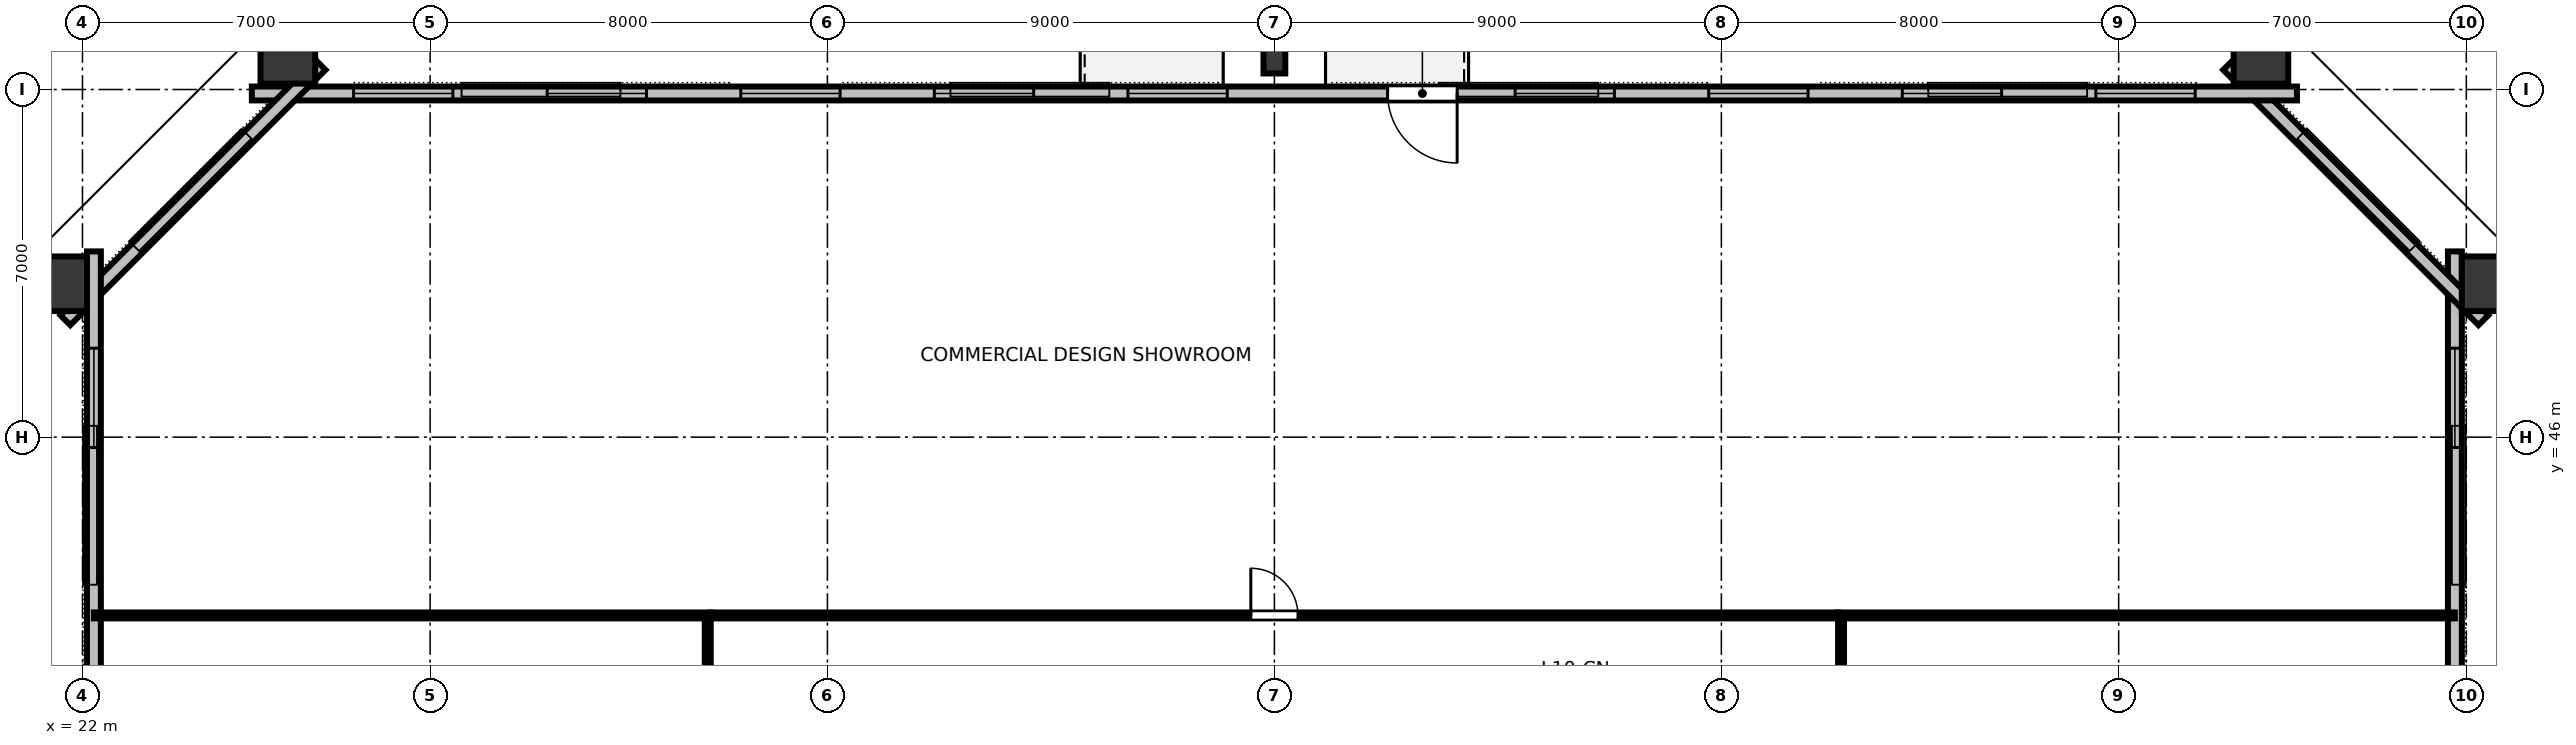
"""IFC4 building model, lengths in metres.
Left out: names, types, materials, properties, quantities, classifications, styles, units other than length and angle.
Written with IfcOpenShell. Run it as: python <this file> out.ifc"""

import sys

from ifc_helpers import new_model, si_unit, direction, frame, frame_2d, origin, origin_2d, place, context, subcontext, project, spatial, rectangle, hollow_rectangle, i_section, extrude, element, fill, save


model = new_model("IFC4")
c1 = context("Model", 3, precision=1e-05, world=origin(), true_north=direction((0.0, 1.0)))
c2 = subcontext(c1, "Body", "Model", "MODEL_VIEW")
j1 = project(units=[si_unit("LENGTHUNIT", "METRE"), si_unit("PLANEANGLEUNIT", "RADIAN")], contexts=[c1])
p1 = place(None, origin())
s1 = spatial("IfcSite", under=j1, at=p1, CompositionType="ELEMENT")
p2 = place(p1, origin())
s2 = spatial("IfcBuilding", under=s1, at=p2, CompositionType="ELEMENT")
p3 = place(p2, frame((0.0, 0.0, 42.4)))
s3 = spatial("IfcBuildingStorey", under=s2, at=p3, CompositionType="ELEMENT", Elevation=42.4)
for number, where, z_axis, x_axis in (
    (1, (70.559, 49.089, 0.0), (0.0, 0.0, 1.0), (0.0, 1.0, 0.0)),
    (2, (65.865, 53.768, 0.0), (0.0, 0.0, 1.0), (1.0, 0.0, 0.0)),
):
    element("IfcColumn", number, at=place(p3, frame(where, z_axis=z_axis, x_axis=x_axis)), inside=s3, PredefinedType="COLUMN", context=c2, shape_type="SweptSolid", body=[
        extrude(hollow_rectangle(XDim=1.1, YDim=1.3, WallThickness=0.07, at=origin_2d()), origin(), (0.0, 0.0, 1.0), 3.148),
    ])
p4 = place(p3, frame((46.0, 53.58, 0.0), z_axis=(0.0, 0.0, 1.0), x_axis=(1.0, 0.0, 0.0)))
e3 = element("IfcColumn", 3, at=p4, inside=s3, PredefinedType="COLUMN", context=c2, shape_type="SweptSolid", body=[
    extrude(i_section(OverallWidth=0.439, OverallDepth=0.514, WebThickness=0.06, FlangeThickness=0.097, FilletRadius=0.025, at=origin_2d()), origin(), (0.0, 0.0, 1.0), 3.148),
])
for number, where, z_axis, x_axis in (
    (4, (26.135, 53.768, 0.0), (0.0, 0.0, 1.0), (1.0, 0.0, 0.0)),
    (5, (21.441, 49.089, 0.0), (0.0, 0.0, 1.0), (0.0, 1.0, 0.0)),
):
    element("IfcColumn", number, at=place(p3, frame(where, z_axis=z_axis, x_axis=x_axis)), inside=s3, PredefinedType="COLUMN", context=c2, shape_type="SweptSolid", body=[
        extrude(hollow_rectangle(XDim=1.1, YDim=1.3, WallThickness=0.07, at=origin_2d()), origin(), (0.0, 0.0, 1.0), 3.148),
    ])
p5 = place(p3, frame((69.77, 14.26, 0.0), z_axis=(0.0, 0.0, 1.0), x_axis=(0.0, 1.0, 0.0)))
e6 = element("IfcWall", 6, at=p5, inside=s3, PredefinedType="STANDARD", context=c2, shape_type="SweptSolid", body=[
    extrude(rectangle(XDim=35.48, YDim=0.28, at=frame_2d((17.74, 0.0))), origin(), (0.0, 0.0, 1.0), 3.15),
])
p6 = place(p5, frame((1.949, 0.0, 0.8)))
e7 = element("IfcOpeningElement", 7, at=p6, cuts=e6, PredefinedType="OPENING", context=c2, shape_type="SweptSolid", body=[
    extrude(rectangle(XDim=2.0, YDim=1.95, at=frame_2d((1.0, 0.975))), frame((0.0, 0.15, 0.0), z_axis=(0.0, -1.0, 0.0), x_axis=(1.0, 0.0, 0.0)), (0.0, 0.0, 1.0), 0.3),
])
p7 = place(p5, frame((9.344, 0.0, 0.8)))
e8 = element("IfcOpeningElement", 8, at=p7, cuts=e6, PredefinedType="OPENING", context=c2, shape_type="SweptSolid", body=[
    extrude(rectangle(XDim=2.0, YDim=1.95, at=frame_2d((1.0, 0.975))), frame((0.0, 0.15, 0.0), z_axis=(0.0, -1.0, 0.0), x_axis=(1.0, 0.0, 0.0)), (0.0, 0.0, 1.0), 0.3),
])
p8 = place(p5, frame((13.042, 0.0, 0.8)))
e9 = element("IfcOpeningElement", 9, at=p8, cuts=e6, PredefinedType="OPENING", context=c2, shape_type="SweptSolid", body=[
    extrude(rectangle(XDim=2.0, YDim=1.95, at=frame_2d((1.0, 0.975))), frame((0.0, 0.15, 0.0), z_axis=(0.0, -1.0, 0.0), x_axis=(1.0, 0.0, 0.0)), (0.0, 0.0, 1.0), 0.3),
])
p9 = place(p5, frame((20.438, 0.0, 0.8)))
e10 = element("IfcOpeningElement", 10, at=p9, cuts=e6, PredefinedType="OPENING", context=c2, shape_type="SweptSolid", body=[
    extrude(rectangle(XDim=2.0, YDim=1.95, at=frame_2d((1.0, 0.975))), frame((0.0, 0.15, 0.0), z_axis=(0.0, -1.0, 0.0), x_axis=(1.0, 0.0, 0.0)), (0.0, 0.0, 1.0), 0.3),
])
p10 = place(p5, frame((24.135, 0.0, 0.8)))
e11 = element("IfcOpeningElement", 11, at=p10, cuts=e6, PredefinedType="OPENING", context=c2, shape_type="SweptSolid", body=[
    extrude(rectangle(XDim=2.0, YDim=1.95, at=frame_2d((1.0, 0.975))), frame((0.0, 0.15, 0.0), z_axis=(0.0, -1.0, 0.0), x_axis=(1.0, 0.0, 0.0)), (0.0, 0.0, 1.0), 0.3),
])
p11 = place(p5, frame((31.531, 0.0, 0.8)))
e12 = element("IfcOpeningElement", 12, at=p11, cuts=e6, PredefinedType="OPENING", context=c2, shape_type="SweptSolid", body=[
    extrude(rectangle(XDim=2.0, YDim=1.95, at=frame_2d((1.0, 0.975))), frame((0.0, 0.15, 0.0), z_axis=(0.0, -1.0, 0.0), x_axis=(1.0, 0.0, 0.0)), (0.0, 0.0, 1.0), 0.3),
])
p12 = place(p3, frame((70.344, 48.354, 0.0), z_axis=(0.0, 0.0, 1.0), x_axis=(-0.707106781187, 0.707106781187, 0.0)))
e13 = element("IfcWall", 13, at=p12, inside=s3, PredefinedType="STANDARD", context=c2, shape_type="SweptSolid", body=[
    extrude(rectangle(XDim=7.268, YDim=0.28, at=frame_2d((3.634, 0.0))), origin(), (0.0, 0.0, 1.0), 3.15),
])
p13 = place(p3, frame((66.59, 52.92, 0.0), z_axis=(0.0, 0.0, 1.0), x_axis=(-1.0, 0.0, 0.0)))
e14 = element("IfcWall", 14, at=p13, inside=s3, PredefinedType="STANDARD", context=c2, shape_type="SweptSolid", body=[
    extrude(rectangle(XDim=41.18, YDim=0.28, at=frame_2d((20.59, 0.0))), origin(), (0.0, 0.0, 1.0), 3.15),
])
p14 = place(p13, frame((16.91, 0.0, 0.0)))
e15 = element("IfcOpeningElement", 15, at=p14, cuts=e14, PredefinedType="OPENING", context=c2, shape_type="SweptSolid", body=[
    extrude(rectangle(XDim=1.4, YDim=2.15, at=frame_2d((0.7, 1.075))), frame((0.0, 0.15, 0.0), z_axis=(0.0, -1.0, 0.0), x_axis=(1.0, 0.0, 0.0)), (0.0, 0.0, 1.0), 0.3),
])
p15 = place(p13, frame((2.049, 0.0, 0.8)))
e16 = element("IfcOpeningElement", 16, at=p15, cuts=e14, PredefinedType="OPENING", context=c2, shape_type="SweptSolid", body=[
    extrude(rectangle(XDim=2.0, YDim=1.95, at=frame_2d((1.0, 0.975))), frame((0.0, 0.15, 0.0), z_axis=(0.0, -1.0, 0.0), x_axis=(1.0, 0.0, 0.0)), (0.0, 0.0, 1.0), 0.3),
])
p16 = place(p13, frame((5.947, 0.0, 0.8)))
e17 = element("IfcOpeningElement", 17, at=p16, cuts=e14, PredefinedType="OPENING", context=c2, shape_type="SweptSolid", body=[
    extrude(rectangle(XDim=2.0, YDim=1.95, at=frame_2d((1.0, 0.975))), frame((0.0, 0.15, 0.0), z_axis=(0.0, -1.0, 0.0), x_axis=(1.0, 0.0, 0.0)), (0.0, 0.0, 1.0), 0.3),
])
p17 = place(p13, frame((9.845, 0.0, 0.8)))
e18 = element("IfcOpeningElement", 18, at=p17, cuts=e14, PredefinedType="OPENING", context=c2, shape_type="SweptSolid", body=[
    extrude(rectangle(XDim=2.0, YDim=1.95, at=frame_2d((1.0, 0.975))), frame((0.0, 0.15, 0.0), z_axis=(0.0, -1.0, 0.0), x_axis=(1.0, 0.0, 0.0)), (0.0, 0.0, 1.0), 0.3),
])
p18 = place(p13, frame((13.743, 0.0, 0.8)))
e19 = element("IfcOpeningElement", 19, at=p18, cuts=e14, PredefinedType="OPENING", context=c2, shape_type="SweptSolid", body=[
    extrude(rectangle(XDim=2.0, YDim=1.95, at=frame_2d((1.0, 0.975))), frame((0.0, 0.15, 0.0), z_axis=(0.0, -1.0, 0.0), x_axis=(1.0, 0.0, 0.0)), (0.0, 0.0, 1.0), 0.3),
])
p19 = place(p13, frame((21.539, 0.0, 0.8)))
e20 = element("IfcOpeningElement", 20, at=p19, cuts=e14, PredefinedType="OPENING", context=c2, shape_type="SweptSolid", body=[
    extrude(rectangle(XDim=2.0, YDim=1.95, at=frame_2d((1.0, 0.975))), frame((0.0, 0.15, 0.0), z_axis=(0.0, -1.0, 0.0), x_axis=(1.0, 0.0, 0.0)), (0.0, 0.0, 1.0), 0.3),
])
p20 = place(p13, frame((25.437, 0.0, 0.8)))
e21 = element("IfcOpeningElement", 21, at=p20, cuts=e14, PredefinedType="OPENING", context=c2, shape_type="SweptSolid", body=[
    extrude(rectangle(XDim=2.0, YDim=1.95, at=frame_2d((1.0, 0.975))), frame((0.0, 0.15, 0.0), z_axis=(0.0, -1.0, 0.0), x_axis=(1.0, 0.0, 0.0)), (0.0, 0.0, 1.0), 0.3),
])
p21 = place(p13, frame((29.335, 0.0, 0.8)))
e22 = element("IfcOpeningElement", 22, at=p21, cuts=e14, PredefinedType="OPENING", context=c2, shape_type="SweptSolid", body=[
    extrude(rectangle(XDim=2.0, YDim=1.95, at=frame_2d((1.0, 0.975))), frame((0.0, 0.15, 0.0), z_axis=(0.0, -1.0, 0.0), x_axis=(1.0, 0.0, 0.0)), (0.0, 0.0, 1.0), 0.3),
])
p22 = place(p13, frame((33.233, 0.0, 0.8)))
e23 = element("IfcOpeningElement", 23, at=p22, cuts=e14, PredefinedType="OPENING", context=c2, shape_type="SweptSolid", body=[
    extrude(rectangle(XDim=2.0, YDim=1.95, at=frame_2d((1.0, 0.975))), frame((0.0, 0.15, 0.0), z_axis=(0.0, -1.0, 0.0), x_axis=(1.0, 0.0, 0.0)), (0.0, 0.0, 1.0), 0.3),
])
p23 = place(p13, frame((37.131, 0.0, 0.8)))
e24 = element("IfcOpeningElement", 24, at=p23, cuts=e14, PredefinedType="OPENING", context=c2, shape_type="SweptSolid", body=[
    extrude(rectangle(XDim=2.0, YDim=1.95, at=frame_2d((1.0, 0.975))), frame((0.0, 0.15, 0.0), z_axis=(0.0, -1.0, 0.0), x_axis=(1.0, 0.0, 0.0)), (0.0, 0.0, 1.0), 0.3),
])
p24 = place(p3, frame((26.795, 53.494, 0.0), z_axis=(0.0, 0.0, 1.0), x_axis=(-0.707106781187, -0.707106781187, 0.0)))
e25 = element("IfcWall", 25, at=p24, inside=s3, PredefinedType="STANDARD", context=c2, shape_type="SweptSolid", body=[
    extrude(rectangle(XDim=7.268, YDim=0.28, at=frame_2d((3.634, 0.0))), origin(), (0.0, 0.0, 1.0), 3.15),
])
p25 = place(p3, frame((22.23, 49.74, 0.0), z_axis=(0.0, 0.0, 1.0), x_axis=(0.0, -1.0, 0.0)))
e26 = element("IfcWall", 26, at=p25, inside=s3, PredefinedType="STANDARD", context=c2, shape_type="SweptSolid", body=[
    extrude(rectangle(XDim=35.48, YDim=0.28, at=frame_2d((17.74, 0.0))), origin(), (0.0, 0.0, 1.0), 3.15),
])
p26 = place(p25, frame((1.949, 0.0, 0.8)))
e27 = element("IfcOpeningElement", 27, at=p26, cuts=e26, PredefinedType="OPENING", context=c2, shape_type="SweptSolid", body=[
    extrude(rectangle(XDim=2.0, YDim=1.95, at=frame_2d((1.0, 0.975))), frame((0.0, 0.15, 0.0), z_axis=(0.0, -1.0, 0.0), x_axis=(1.0, 0.0, 0.0)), (0.0, 0.0, 1.0), 0.3),
])
p27 = place(p25, frame((9.344, 0.0, 0.8)))
e28 = element("IfcOpeningElement", 28, at=p27, cuts=e26, PredefinedType="OPENING", context=c2, shape_type="SweptSolid", body=[
    extrude(rectangle(XDim=2.0, YDim=1.95, at=frame_2d((1.0, 0.975))), frame((0.0, 0.15, 0.0), z_axis=(0.0, -1.0, 0.0), x_axis=(1.0, 0.0, 0.0)), (0.0, 0.0, 1.0), 0.3),
])
p28 = place(p25, frame((24.135, 0.0, 0.8)))
e29 = element("IfcOpeningElement", 29, at=p28, cuts=e26, PredefinedType="OPENING", context=c2, shape_type="SweptSolid", body=[
    extrude(rectangle(XDim=2.0, YDim=1.95, at=frame_2d((1.0, 0.975))), frame((0.0, 0.15, 0.0), z_axis=(0.0, -1.0, 0.0), x_axis=(1.0, 0.0, 0.0)), (0.0, 0.0, 1.0), 0.3),
])
p29 = place(p25, frame((31.531, 0.0, 0.8)))
e30 = element("IfcOpeningElement", 30, at=p29, cuts=e26, PredefinedType="OPENING", context=c2, shape_type="SweptSolid", body=[
    extrude(rectangle(XDim=2.0, YDim=1.95, at=frame_2d((1.0, 0.975))), frame((0.0, 0.15, 0.0), z_axis=(0.0, -1.0, 0.0), x_axis=(1.0, 0.0, 0.0)), (0.0, 0.0, 1.0), 0.3),
])
p30 = place(p3, frame((34.65, 42.41, 0.0), z_axis=(0.0, 0.0, 1.0), x_axis=(1.0, 0.0, 0.0)))
e31 = element("IfcWall", 31, at=p30, inside=s3, PredefinedType="PARTITIONING", context=c2, shape_type="SweptSolid", body=[
    extrude(rectangle(XDim=22.7, YDim=0.12, at=frame_2d((11.35, 0.0))), origin(), (0.0, 0.0, 1.0), 2.43),
])
p31 = place(p30, frame((10.875, 0.0, 0.0)))
e32 = element("IfcOpeningElement", 32, at=p31, cuts=e31, PredefinedType="OPENING", context=c2, shape_type="SweptSolid", body=[
    extrude(rectangle(XDim=0.95, YDim=2.15, at=frame_2d((0.475, 1.075))), frame((0.0, 0.07, 0.0), z_axis=(0.0, -1.0, 0.0), x_axis=(1.0, 0.0, 0.0)), (0.0, 0.0, 1.0), 0.14),
])
p32 = place(p3, frame((34.59, 21.65, 0.0), z_axis=(0.0, 0.0, 1.0), x_axis=(0.0, 1.0, 0.0)))
e33 = element("IfcWall", 33, at=p32, inside=s3, PredefinedType="PARTITIONING", context=c2, shape_type="SweptSolid", body=[
    extrude(rectangle(XDim=20.7, YDim=0.12, at=frame_2d((10.35, 0.0))), origin(), (0.0, 0.0, 1.0), 2.43),
])
p33 = place(p32, frame((3.402, 0.0, 0.0)))
e34 = element("IfcOpeningElement", 34, at=p33, cuts=e33, PredefinedType="OPENING", context=c2, shape_type="SweptSolid", body=[
    extrude(rectangle(XDim=0.95, YDim=2.15, at=frame_2d((0.475, 1.075))), frame((0.0, 0.07, 0.0), z_axis=(0.0, -1.0, 0.0), x_axis=(1.0, 0.0, 0.0)), (0.0, 0.0, 1.0), 0.14),
])
p34 = place(p32, frame((9.912, 0.0, 0.0)))
e35 = element("IfcOpeningElement", 35, at=p34, cuts=e33, PredefinedType="OPENING", context=c2, shape_type="SweptSolid", body=[
    extrude(rectangle(XDim=0.95, YDim=2.15, at=frame_2d((0.475, 1.075))), frame((0.0, 0.07, 0.0), z_axis=(0.0, -1.0, 0.0), x_axis=(1.0, 0.0, 0.0)), (0.0, 0.0, 1.0), 0.14),
])
p35 = place(p32, frame((16.385, 0.0, 0.0)))
e36 = element("IfcOpeningElement", 36, at=p35, cuts=e33, PredefinedType="OPENING", context=c2, shape_type="SweptSolid", body=[
    extrude(rectangle(XDim=0.95, YDim=2.15, at=frame_2d((0.475, 1.075))), frame((0.0, 0.07, 0.0), z_axis=(0.0, -1.0, 0.0), x_axis=(1.0, 0.0, 0.0)), (0.0, 0.0, 1.0), 0.14),
])
p36 = place(p3, frame((57.41, 21.65, 0.0), z_axis=(0.0, 0.0, 1.0), x_axis=(0.0, 1.0, 0.0)))
e37 = element("IfcWall", 37, at=p36, inside=s3, PredefinedType="PARTITIONING", context=c2, shape_type="SweptSolid", body=[
    extrude(rectangle(XDim=20.7, YDim=0.12, at=frame_2d((10.35, 0.0))), origin(), (0.0, 0.0, 1.0), 2.43),
])
p37 = place(p36, frame((9.875, 0.0, 0.0)))
e38 = element("IfcOpeningElement", 38, at=p37, cuts=e37, PredefinedType="OPENING", context=c2, shape_type="SweptSolid", body=[
    extrude(rectangle(XDim=0.95, YDim=2.15, at=frame_2d((0.475, 1.075))), frame((0.0, 0.07, 0.0), z_axis=(0.0, -1.0, 0.0), x_axis=(1.0, 0.0, 0.0)), (0.0, 0.0, 1.0), 0.14),
])
for number, where, z_axis, x_axis in (
    (39, (34.65, 42.41, 0.0), (0.0, 0.0, 1.0), (-1.0, 0.0, 0.0)),
    (40, (57.35, 42.41, 0.0), (0.0, 0.0, 1.0), (1.0, 0.0, 0.0)),
):
    element("IfcWall", number, at=place(p3, frame(where, z_axis=z_axis, x_axis=x_axis)), inside=s3, PredefinedType="PARTITIONING", context=c2, shape_type="SweptSolid", body=[
        extrude(rectangle(XDim=12.42, YDim=0.12, at=frame_2d((6.21, 0.0))), origin(), (0.0, 0.0, 1.0), 2.43),
    ])
p38 = place(p11, origin())
e41 = element("IfcWindow", 41, at=p38, inside=s3, PartitioningType="SINGLE_PANEL", PredefinedType="WINDOW", context=c2, shape_type="SweptSolid", body=[
    extrude(rectangle(XDim=2.0, YDim=1.95, at=frame_2d((1.0, 0.975))), frame((0.0, 0.03, 0.0), z_axis=(0.0, -1.0, 0.0), x_axis=(1.0, 0.0, 0.0)), (0.0, 0.0, 1.0), 0.06),
])
fill(e12, e41)
p39 = place(p14, origin())
e42 = element("IfcDoor", 42, at=p39, inside=s3, OperationType="SINGLE_SWING_LEFT", PredefinedType="DOOR", context=c2, shape_type="SweptSolid", body=[
    extrude(rectangle(XDim=1.4, YDim=2.15, at=frame_2d((0.7, 1.075))), frame((0.0, 0.025, 0.0), z_axis=(0.0, -1.0, 0.0), x_axis=(1.0, 0.0, 0.0)), (0.0, 0.0, 1.0), 0.05),
])
fill(e15, e42)
p40 = place(p15, origin())
e43 = element("IfcWindow", 43, at=p40, inside=s3, PartitioningType="SINGLE_PANEL", PredefinedType="WINDOW", context=c2, shape_type="SweptSolid", body=[
    extrude(rectangle(XDim=2.0, YDim=1.95, at=frame_2d((1.0, 0.975))), frame((0.0, 0.03, 0.0), z_axis=(0.0, -1.0, 0.0), x_axis=(1.0, 0.0, 0.0)), (0.0, 0.0, 1.0), 0.06),
])
fill(e16, e43)
p41 = place(p16, origin())
e44 = element("IfcWindow", 44, at=p41, inside=s3, PartitioningType="SINGLE_PANEL", PredefinedType="WINDOW", context=c2, shape_type="SweptSolid", body=[
    extrude(rectangle(XDim=2.0, YDim=1.95, at=frame_2d((1.0, 0.975))), frame((0.0, 0.03, 0.0), z_axis=(0.0, -1.0, 0.0), x_axis=(1.0, 0.0, 0.0)), (0.0, 0.0, 1.0), 0.06),
])
fill(e17, e44)
p42 = place(p17, origin())
e45 = element("IfcWindow", 45, at=p42, inside=s3, PartitioningType="SINGLE_PANEL", PredefinedType="WINDOW", context=c2, shape_type="SweptSolid", body=[
    extrude(rectangle(XDim=2.0, YDim=1.95, at=frame_2d((1.0, 0.975))), frame((0.0, 0.03, 0.0), z_axis=(0.0, -1.0, 0.0), x_axis=(1.0, 0.0, 0.0)), (0.0, 0.0, 1.0), 0.06),
])
fill(e18, e45)
p43 = place(p18, origin())
e46 = element("IfcWindow", 46, at=p43, inside=s3, PartitioningType="SINGLE_PANEL", PredefinedType="WINDOW", context=c2, shape_type="SweptSolid", body=[
    extrude(rectangle(XDim=2.0, YDim=1.95, at=frame_2d((1.0, 0.975))), frame((0.0, 0.03, 0.0), z_axis=(0.0, -1.0, 0.0), x_axis=(1.0, 0.0, 0.0)), (0.0, 0.0, 1.0), 0.06),
])
fill(e19, e46)
p44 = place(p19, origin())
e47 = element("IfcWindow", 47, at=p44, inside=s3, PartitioningType="SINGLE_PANEL", PredefinedType="WINDOW", context=c2, shape_type="SweptSolid", body=[
    extrude(rectangle(XDim=2.0, YDim=1.95, at=frame_2d((1.0, 0.975))), frame((0.0, 0.03, 0.0), z_axis=(0.0, -1.0, 0.0), x_axis=(1.0, 0.0, 0.0)), (0.0, 0.0, 1.0), 0.06),
])
fill(e20, e47)
p45 = place(p20, origin())
e48 = element("IfcWindow", 48, at=p45, inside=s3, PartitioningType="SINGLE_PANEL", PredefinedType="WINDOW", context=c2, shape_type="SweptSolid", body=[
    extrude(rectangle(XDim=2.0, YDim=1.95, at=frame_2d((1.0, 0.975))), frame((0.0, 0.03, 0.0), z_axis=(0.0, -1.0, 0.0), x_axis=(1.0, 0.0, 0.0)), (0.0, 0.0, 1.0), 0.06),
])
fill(e21, e48)
p46 = place(p21, origin())
e49 = element("IfcWindow", 49, at=p46, inside=s3, PartitioningType="SINGLE_PANEL", PredefinedType="WINDOW", context=c2, shape_type="SweptSolid", body=[
    extrude(rectangle(XDim=2.0, YDim=1.95, at=frame_2d((1.0, 0.975))), frame((0.0, 0.03, 0.0), z_axis=(0.0, -1.0, 0.0), x_axis=(1.0, 0.0, 0.0)), (0.0, 0.0, 1.0), 0.06),
])
fill(e22, e49)
p47 = place(p22, origin())
e50 = element("IfcWindow", 50, at=p47, inside=s3, PartitioningType="SINGLE_PANEL", PredefinedType="WINDOW", context=c2, shape_type="SweptSolid", body=[
    extrude(rectangle(XDim=2.0, YDim=1.95, at=frame_2d((1.0, 0.975))), frame((0.0, 0.03, 0.0), z_axis=(0.0, -1.0, 0.0), x_axis=(1.0, 0.0, 0.0)), (0.0, 0.0, 1.0), 0.06),
])
fill(e23, e50)
p48 = place(p23, origin())
e51 = element("IfcWindow", 51, at=p48, inside=s3, PartitioningType="SINGLE_PANEL", PredefinedType="WINDOW", context=c2, shape_type="SweptSolid", body=[
    extrude(rectangle(XDim=2.0, YDim=1.95, at=frame_2d((1.0, 0.975))), frame((0.0, 0.03, 0.0), z_axis=(0.0, -1.0, 0.0), x_axis=(1.0, 0.0, 0.0)), (0.0, 0.0, 1.0), 0.06),
])
fill(e24, e51)
p49 = place(p26, origin())
e52 = element("IfcWindow", 52, at=p49, inside=s3, PartitioningType="SINGLE_PANEL", PredefinedType="WINDOW", context=c2, shape_type="SweptSolid", body=[
    extrude(rectangle(XDim=2.0, YDim=1.95, at=frame_2d((1.0, 0.975))), frame((0.0, 0.03, 0.0), z_axis=(0.0, -1.0, 0.0), x_axis=(1.0, 0.0, 0.0)), (0.0, 0.0, 1.0), 0.06),
])
fill(e27, e52)
p50 = place(p31, origin())
e53 = element("IfcDoor", 53, at=p50, inside=s3, OperationType="SINGLE_SWING_LEFT", PredefinedType="DOOR", context=c2, shape_type="SweptSolid", body=[
    extrude(rectangle(XDim=0.95, YDim=2.15, at=frame_2d((0.475, 1.075))), frame((0.0, 0.025, 0.0), z_axis=(0.0, -1.0, 0.0), x_axis=(1.0, 0.0, 0.0)), (0.0, 0.0, 1.0), 0.05),
])
fill(e32, e53)
save(model, sys.argv[1])
